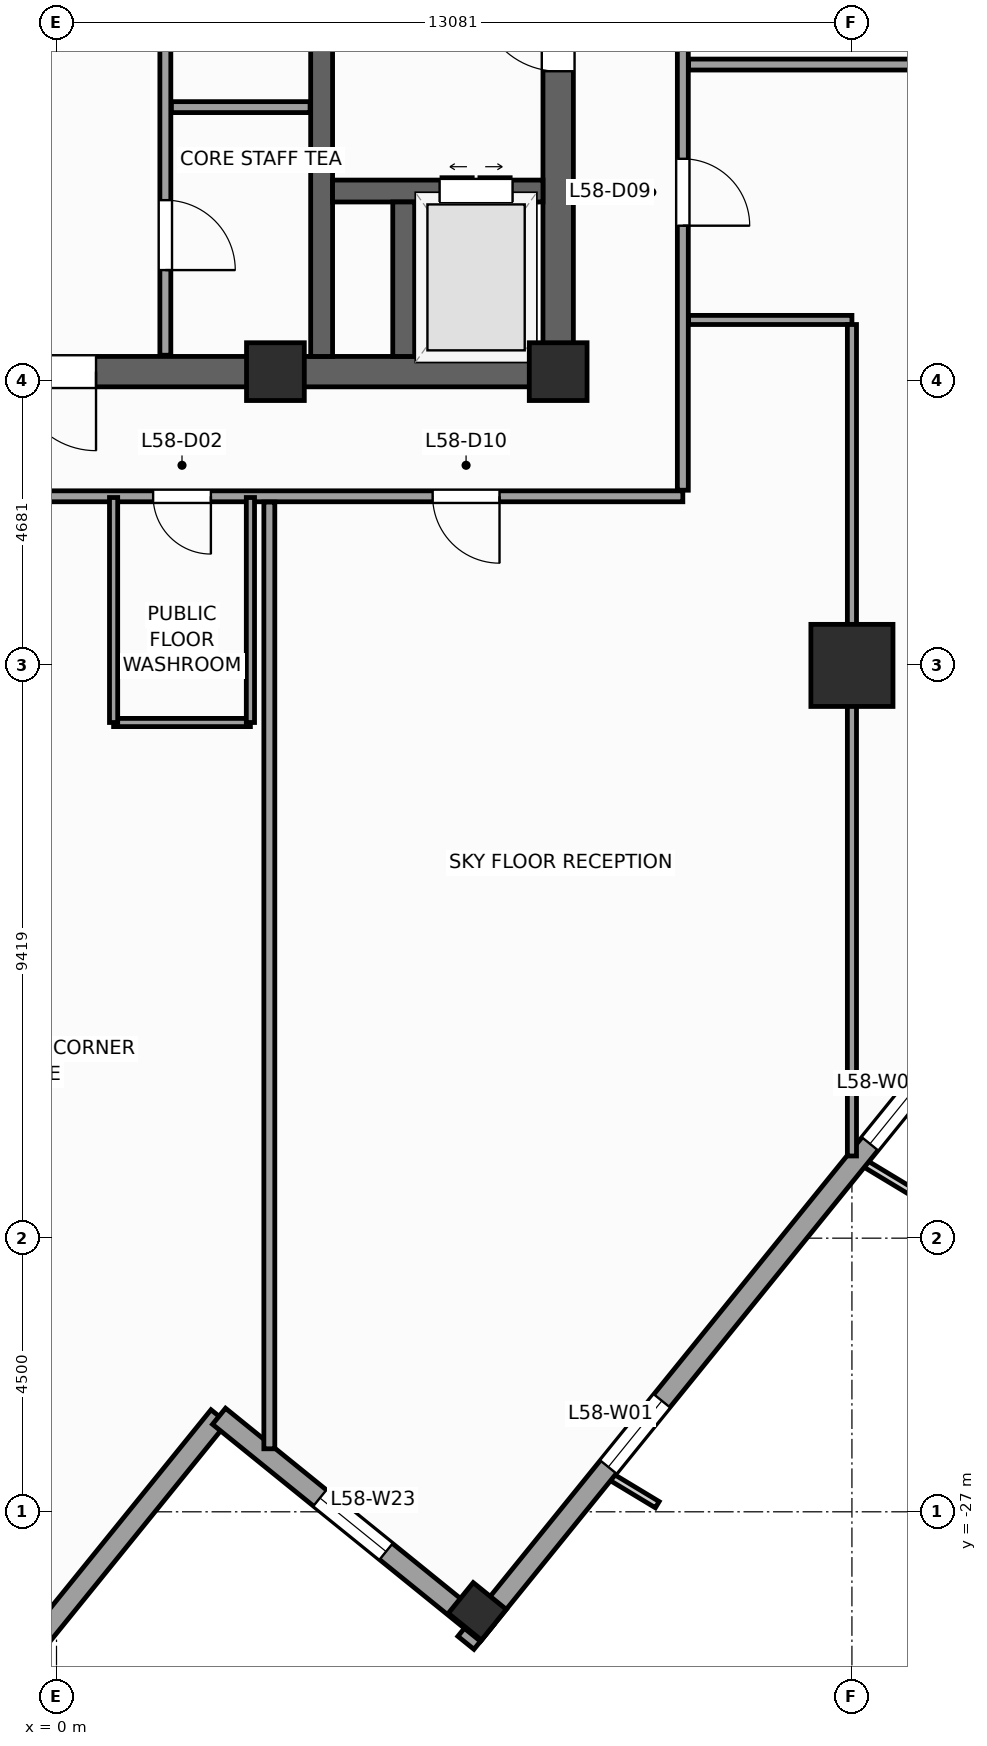
"""IFC4 building model, lengths in metres.
Left out: names, types, materials, properties, quantities, classifications, styles, units other than length and angle.
Written with IfcOpenShell. Run it as: python <this file> out.ifc"""

import sys

from ifc_helpers import new_model, si_unit, direction, frame, frame_2d, origin, origin_2d, place, context, subcontext, project, spatial, rectangle, extrude, source, transform, mapped, element, fill, save


model = new_model("IFC4")
c1 = context("Model", 3, precision=1e-05, world=origin(), true_north=direction((0.0, 1.0)))
c2 = subcontext(c1, "Body", "Model", "MODEL_VIEW")
j1 = project(units=[si_unit("LENGTHUNIT", "METRE"), si_unit("PLANEANGLEUNIT", "RADIAN")], contexts=[c1])
p1 = place(None, origin())
s1 = spatial("IfcSite", under=j1, at=p1, CompositionType="ELEMENT")
p2 = place(p1, origin())
s2 = spatial("IfcBuilding", under=s1, at=p2, CompositionType="ELEMENT")
p3 = place(p2, frame((0.0, 0.0, 240.7)))
s3 = spatial("IfcBuildingStorey", under=s2, at=p3, CompositionType="ELEMENT", Elevation=240.7)
p4 = place(p3, frame((-8.5, -8.25, 0.0), z_axis=(0.0, 0.0, 1.0), x_axis=(1.0, 0.0, 0.0)))
e1 = element("IfcWall", 1, at=p4, inside=s3, PredefinedType="SHEAR", context=c2, shape_type="SweptSolid", body=[
    extrude(rectangle(XDim=17.0, YDim=0.5, at=frame_2d((8.5, 0.0))), origin(), (0.0, 0.0, 1.0), 3.9),
])
p5 = place(p4, frame((7.85, 0.0, 0.0)))
e2 = element("IfcOpeningElement", 2, at=p5, cuts=e1, PredefinedType="OPENING", context=c2, shape_type="SweptSolid", body=[
    extrude(rectangle(XDim=1.3, YDim=2.2, at=frame_2d((0.65, 1.1))), frame((0.0, 0.26, 0.0), z_axis=(0.0, -1.0, 0.0), x_axis=(1.0, 0.0, 0.0)), (0.0, 0.0, 1.0), 0.52),
])
p6 = place(p3, frame((8.25, -8.0, 0.0), z_axis=(0.0, 0.0, 1.0), x_axis=(0.0, 1.0, 0.0)))
e3 = element("IfcWall", 3, at=p6, inside=s3, PredefinedType="SHEAR", context=c2, shape_type="SweptSolid", body=[
    extrude(rectangle(XDim=16.0, YDim=0.5, at=frame_2d((8.0, 0.0))), origin(), (0.0, 0.0, 1.0), 3.9),
])
p7 = place(p6, frame((4.69, 0.0, 0.0)))
e4 = element("IfcOpeningElement", 4, at=p7, cuts=e3, PredefinedType="OPENING", context=c2, shape_type="SweptSolid", body=[
    extrude(rectangle(XDim=1.3, YDim=2.2, at=frame_2d((0.65, 1.1))), frame((0.0, 0.26, 0.0), z_axis=(0.0, -1.0, 0.0), x_axis=(1.0, 0.0, 0.0)), (0.0, 0.0, 1.0), 0.52),
])
p8 = place(p3, frame((4.36, -8.0, 0.0), z_axis=(0.0, 0.0, 1.0), x_axis=(0.0, 1.0, 0.0)))
e5 = element("IfcWall", 5, at=p8, inside=s3, PredefinedType="SHEAR", context=c2, shape_type="SweptSolid", body=[
    extrude(rectangle(XDim=16.0, YDim=0.36, at=frame_2d((8.0, 0.0))), origin(), (0.0, 0.0, 1.0), 3.9),
])
p9 = place(p3, frame((4.54, -5.28, 0.0), z_axis=(0.0, 0.0, 1.0), x_axis=(1.0, 0.0, 0.0)))
e6 = element("IfcWall", 6, at=p9, inside=s3, PredefinedType="SHEAR", context=c2, shape_type="SweptSolid", body=[
    extrude(rectangle(XDim=3.46, YDim=0.36, at=frame_2d((1.73, 0.0))), origin(), (0.0, 0.0, 1.0), 3.9),
])
p10 = place(p9, frame((1.76, 0.0, 0.0)))
e7 = element("IfcOpeningElement", 7, at=p10, cuts=e6, PredefinedType="OPENING", context=c2, shape_type="SweptSolid", body=[
    extrude(rectangle(XDim=1.2, YDim=2.25, at=frame_2d((0.6, 1.125))), frame((0.0, 0.19, 0.0), z_axis=(0.0, -1.0, 0.0), x_axis=(1.0, 0.0, 0.0)), (0.0, 0.0, 1.0), 0.38),
])
p11 = place(p3, frame((5.71, -8.0, 0.0), z_axis=(0.0, 0.0, 1.0), x_axis=(0.0, 1.0, 0.0)))
e8 = element("IfcWall", 8, at=p11, inside=s3, PredefinedType="SHEAR", context=c2, shape_type="SweptSolid", body=[
    extrude(rectangle(XDim=2.54, YDim=0.36, at=frame_2d((1.27, 0.0))), origin(), (0.0, 0.0, 1.0), 3.9),
])
m1 = source(origin(), c2, "Body", "SweptSolid", [
    extrude(rectangle(XDim=0.95, YDim=0.95, at=origin_2d()), origin(), (0.0, 0.0, 1.0), 3.9),
])
for number, where, z_axis, x_axis in (
    (9, (8.25, -8.25, 0.0), (0.0, 0.0, 1.0), (1.0, 0.0, 0.0)),
    (10, (3.6, -8.25, 0.0), (0.0, 0.0, 1.0), (1.0, 0.0, 0.0)),
):
    element("IfcColumn", number, at=place(p3, frame(where, z_axis=z_axis, x_axis=x_axis)), inside=s3, PredefinedType="PILASTER", context=c2, shape_type="MappedRepresentation", body=[
        mapped(m1, transform((0.0, 0.0, 0.0), scale=1.0)),
    ])
m2 = source(origin(), c2, "Body", "SweptSolid", [
    extrude(rectangle(XDim=1.35, YDim=1.35, at=origin_2d()), origin(), (0.0, 0.0, 1.0), 3.9),
])
p12 = place(p3, frame((13.081, -13.081, 0.0), z_axis=(0.0, 0.0, 1.0), x_axis=(1.0, 0.0, 0.0)))
e11 = element("IfcColumn", 11, at=p12, inside=s3, PredefinedType="COLUMN", context=c2, shape_type="MappedRepresentation", body=[
    mapped(m2, transform((0.0, 0.0, 0.0), scale=1.0)),
])
m3 = source(origin(), c2, "Body", "SweptSolid", [
    extrude(rectangle(XDim=0.65, YDim=0.7, at=origin_2d()), origin(), (0.0, 0.0, 1.0), 3.9),
])
p13 = place(p3, frame((6.92, -28.637, 0.0), z_axis=(0.0, 0.0, 1.0), x_axis=(0.62932039105, 0.777145961457, 0.0)))
e12 = element("IfcColumn", 12, at=p13, inside=s3, PredefinedType="COLUMN", context=c2, shape_type="MappedRepresentation", body=[
    mapped(m3, transform((0.0, 0.0, 0.0), scale=1.0)),
])
p14 = place(p3, frame((6.733, -29.154, 0.0), z_axis=(0.0, 0.0, 1.0), x_axis=(0.629325378072, 0.77714192302, 0.0)))
e13 = element("IfcWall", 13, at=p14, inside=s3, PredefinedType="STANDARD", context=c2, shape_type="SweptSolid", body=[
    extrude(rectangle(XDim=36.84, YDim=0.34, at=frame_2d((18.42, 0.0))), origin(), (0.0, 0.0, 1.0), 2.96),
])
p15 = place(p14, frame((3.721, 0.0, 0.48)))
e14 = element("IfcOpeningElement", 14, at=p15, cuts=e13, PredefinedType="OPENING", context=c2, shape_type="SweptSolid", body=[
    extrude(rectangle(XDim=1.4, YDim=2.4, at=frame_2d((0.7, 1.2))), frame((0.0, 0.18, 0.0), z_axis=(0.0, -1.0, 0.0), x_axis=(1.0, 0.0, 0.0)), (0.0, 0.0, 1.0), 0.36),
])
p16 = place(p14, frame((10.559, 0.0, 0.58)))
e15 = element("IfcOpeningElement", 15, at=p16, cuts=e13, PredefinedType="OPENING", context=c2, shape_type="SweptSolid", body=[
    extrude(rectangle(XDim=1.75, YDim=2.3, at=frame_2d((0.875, 1.15))), frame((0.0, 0.18, 0.0), z_axis=(0.0, -1.0, 0.0), x_axis=(1.0, 0.0, 0.0)), (0.0, 0.0, 1.0), 0.36),
])
p17 = place(p14, frame((16.058, 0.0, 0.58)))
e16 = element("IfcOpeningElement", 16, at=p17, cuts=e13, PredefinedType="OPENING", context=c2, shape_type="SweptSolid", body=[
    extrude(rectangle(XDim=1.75, YDim=2.3, at=frame_2d((0.875, 1.15))), frame((0.0, 0.18, 0.0), z_axis=(0.0, -1.0, 0.0), x_axis=(1.0, 0.0, 0.0)), (0.0, 0.0, 1.0), 0.36),
])
p18 = place(p14, frame((24.176, 0.0, 0.58)))
e17 = element("IfcOpeningElement", 17, at=p18, cuts=e13, PredefinedType="OPENING", context=c2, shape_type="SweptSolid", body=[
    extrude(rectangle(XDim=1.75, YDim=2.3, at=frame_2d((0.875, 1.15))), frame((0.0, 0.18, 0.0), z_axis=(0.0, -1.0, 0.0), x_axis=(1.0, 0.0, 0.0)), (0.0, 0.0, 1.0), 0.36),
])
p19 = place(p14, frame((30.982, 0.0, 0.48)))
e18 = element("IfcOpeningElement", 18, at=p19, cuts=e13, PredefinedType="OPENING", context=c2, shape_type="SweptSolid", body=[
    extrude(rectangle(XDim=1.4, YDim=2.4, at=frame_2d((0.7, 1.2))), frame((0.0, 0.18, 0.0), z_axis=(0.0, -1.0, 0.0), x_axis=(1.0, 0.0, 0.0)), (0.0, 0.0, 1.0), 0.36),
])
p20 = place(p3, frame((-0.789, -29.703, 0.0), z_axis=(0.0, 0.0, 1.0), x_axis=(0.629323365087, 0.77714355312, 0.0)))
e19 = element("IfcWall", 19, at=p20, inside=s3, PredefinedType="STANDARD", context=c2, shape_type="SweptSolid", body=[
    extrude(rectangle(XDim=5.5, YDim=0.34, at=frame_2d((2.75, 0.0))), origin(), (0.0, 0.0, 1.0), 3.66),
])
p21 = place(p3, frame((2.673, -25.429, 0.0), z_axis=(0.0, 0.0, 1.0), x_axis=(0.777162640055, -0.629299794138, 0.0)))
e20 = element("IfcWall", 20, at=p21, inside=s3, PredefinedType="STANDARD", context=c2, shape_type="SweptSolid", body=[
    extrude(rectangle(XDim=5.67, YDim=0.34, at=frame_2d((2.835, 0.0))), origin(), (0.0, 0.0, 1.0), 3.66),
])
p22 = place(p21, frame((2.135, 0.0, 0.48)))
e21 = element("IfcOpeningElement", 21, at=p22, cuts=e20, PredefinedType="OPENING", context=c2, shape_type="SweptSolid", body=[
    extrude(rectangle(XDim=1.4, YDim=2.4, at=frame_2d((0.7, 1.2))), frame((0.0, 0.18, 0.0), z_axis=(0.0, -1.0, 0.0), x_axis=(1.0, 0.0, 0.0)), (0.0, 0.0, 1.0), 0.36),
])
p23 = place(p3, frame((1.79, -7.98, 0.0), z_axis=(0.0, 0.0, 1.0), x_axis=(0.0, 1.0, 0.0)))
e22 = element("IfcWall", 22, at=p23, inside=s3, PredefinedType="PARTITIONING", context=c2, shape_type="SweptSolid", body=[
    extrude(rectangle(XDim=12.38, YDim=0.18, at=frame_2d((6.19, 0.0))), origin(), (0.0, 0.0, 1.0), 3.66),
])
p24 = place(p23, frame((8.8, 0.0, 0.0)))
e23 = element("IfcOpeningElement", 23, at=p24, cuts=e22, PredefinedType="OPENING", context=c2, shape_type="SweptSolid", body=[
    extrude(rectangle(XDim=1.1, YDim=2.2, at=frame_2d((0.55, 1.1))), frame((0.0, 0.1, 0.0), z_axis=(0.0, -1.0, 0.0), x_axis=(1.0, 0.0, 0.0)), (0.0, 0.0, 1.0), 0.2),
])
p25 = place(p23, frame((10.86, 0.0, 0.0)))
e24 = element("IfcOpeningElement", 24, at=p25, cuts=e22, PredefinedType="OPENING", context=c2, shape_type="SweptSolid", body=[
    extrude(rectangle(XDim=1.1, YDim=2.2, at=frame_2d((0.55, 1.1))), frame((0.0, 0.1, 0.0), z_axis=(0.0, -1.0, 0.0), x_axis=(1.0, 0.0, 0.0)), (0.0, 0.0, 1.0), 0.2),
])
p26 = place(p23, frame((1.4, 0.0, 0.0)))
e25 = element("IfcOpeningElement", 25, at=p26, cuts=e22, PredefinedType="OPENING", context=c2, shape_type="SweptSolid", body=[
    extrude(rectangle(XDim=1.15, YDim=2.25, at=frame_2d((0.575, 1.125))), frame((0.0, 0.1, 0.0), z_axis=(0.0, -1.0, 0.0), x_axis=(1.0, 0.0, 0.0)), (0.0, 0.0, 1.0), 0.2),
])
p27 = place(p23, frame((5.6, 0.0, 0.0)))
e26 = element("IfcOpeningElement", 26, at=p27, cuts=e22, PredefinedType="OPENING", context=c2, shape_type="SweptSolid", body=[
    extrude(rectangle(XDim=1.15, YDim=2.25, at=frame_2d((0.575, 1.125))), frame((0.0, 0.1, 0.0), z_axis=(0.0, -1.0, 0.0), x_axis=(1.0, 0.0, 0.0)), (0.0, 0.0, 1.0), 0.2),
])
p28 = place(p3, frame((1.89, -3.9, 0.0), z_axis=(0.0, 0.0, 1.0), x_axis=(1.0, 0.0, 0.0)))
e27 = element("IfcWall", 27, at=p28, inside=s3, PredefinedType="PARTITIONING", context=c2, shape_type="SweptSolid", body=[
    extrude(rectangle(XDim=2.28, YDim=0.18, at=frame_2d((1.14, 0.0))), origin(), (0.0, 0.0, 1.0), 3.66),
])
p29 = place(p3, frame((-11.4, -10.3, 0.0), z_axis=(0.0, 0.0, 1.0), x_axis=(1.0, 0.0, 0.0)))
e28 = element("IfcWall", 28, at=p29, inside=s3, PredefinedType="PARTITIONING", context=c2, shape_type="SweptSolid", body=[
    extrude(rectangle(XDim=21.7, YDim=0.18, at=frame_2d((10.85, 0.0))), origin(), (0.0, 0.0, 1.0), 3.66),
])
p30 = place(p29, frame((12.989, 0.0, 0.0)))
e29 = element("IfcOpeningElement", 29, at=p30, cuts=e28, PredefinedType="OPENING", context=c2, shape_type="SweptSolid", body=[
    extrude(rectangle(XDim=0.95, YDim=2.1, at=frame_2d((0.475, 1.05))), frame((0.0, 0.1, 0.0), z_axis=(0.0, -1.0, 0.0), x_axis=(1.0, 0.0, 0.0)), (0.0, 0.0, 1.0), 0.2),
])
p31 = place(p29, frame((17.585, 0.0, 0.0)))
e30 = element("IfcOpeningElement", 30, at=p31, cuts=e28, PredefinedType="OPENING", context=c2, shape_type="SweptSolid", body=[
    extrude(rectangle(XDim=1.1, YDim=2.2, at=frame_2d((0.55, 1.1))), frame((0.0, 0.1, 0.0), z_axis=(0.0, -1.0, 0.0), x_axis=(1.0, 0.0, 0.0)), (0.0, 0.0, 1.0), 0.2),
])
p32 = place(p29, frame((9.075, 0.0, 0.0)))
e31 = element("IfcOpeningElement", 31, at=p32, cuts=e28, PredefinedType="OPENING", context=c2, shape_type="SweptSolid", body=[
    extrude(rectangle(XDim=1.1, YDim=2.2, at=frame_2d((0.55, 1.1))), frame((0.0, 0.1, 0.0), z_axis=(0.0, -1.0, 0.0), x_axis=(1.0, 0.0, 0.0)), (0.0, 0.0, 1.0), 0.2),
])
p33 = place(p29, frame((3.724, 0.0, 0.0)))
e32 = element("IfcOpeningElement", 32, at=p33, cuts=e28, PredefinedType="OPENING", context=c2, shape_type="SweptSolid", body=[
    extrude(rectangle(XDim=1.1, YDim=2.2, at=frame_2d((0.55, 1.1))), frame((0.0, 0.1, 0.0), z_axis=(0.0, -1.0, 0.0), x_axis=(1.0, 0.0, 0.0)), (0.0, 0.0, 1.0), 0.2),
])
p34 = place(p3, frame((10.3, -10.2, 0.0), z_axis=(0.0, 0.0, 1.0), x_axis=(0.0, 1.0, 0.0)))
e33 = element("IfcWall", 33, at=p34, inside=s3, PredefinedType="PARTITIONING", context=c2, shape_type="SweptSolid", body=[
    extrude(rectangle(XDim=20.4, YDim=0.18, at=frame_2d((10.2, 0.0))), origin(), (0.0, 0.0, 1.0), 3.66),
])
p35 = place(p34, frame((14.95, 0.0, 0.0)))
e34 = element("IfcOpeningElement", 34, at=p35, cuts=e33, PredefinedType="OPENING", context=c2, shape_type="SweptSolid", body=[
    extrude(rectangle(XDim=1.1, YDim=2.2, at=frame_2d((0.55, 1.1))), frame((0.0, 0.1, 0.0), z_axis=(0.0, -1.0, 0.0), x_axis=(1.0, 0.0, 0.0)), (0.0, 0.0, 1.0), 0.2),
])
p36 = place(p34, frame((9.65, 0.0, 0.0)))
e35 = element("IfcOpeningElement", 35, at=p36, cuts=e33, PredefinedType="OPENING", context=c2, shape_type="SweptSolid", body=[
    extrude(rectangle(XDim=1.1, YDim=2.2, at=frame_2d((0.55, 1.1))), frame((0.0, 0.1, 0.0), z_axis=(0.0, -1.0, 0.0), x_axis=(1.0, 0.0, 0.0)), (0.0, 0.0, 1.0), 0.2),
])
p37 = place(p34, frame((4.35, 0.0, 0.0)))
e36 = element("IfcOpeningElement", 36, at=p37, cuts=e33, PredefinedType="OPENING", context=c2, shape_type="SweptSolid", body=[
    extrude(rectangle(XDim=1.1, YDim=2.2, at=frame_2d((0.55, 1.1))), frame((0.0, 0.1, 0.0), z_axis=(0.0, -1.0, 0.0), x_axis=(1.0, 0.0, 0.0)), (0.0, 0.0, 1.0), 0.2),
])
p38 = place(p3, frame((10.395, -3.2, 0.0), z_axis=(0.0, 0.0, 1.0), x_axis=(1.0, 0.0, 0.0)))
e37 = element("IfcWall", 37, at=p38, inside=s3, PredefinedType="PARTITIONING", context=c2, shape_type="SweptSolid", body=[
    extrude(rectangle(XDim=17.22, YDim=0.18, at=frame_2d((8.61, 0.0))), origin(), (0.0, 0.0, 1.0), 3.66),
])
p39 = place(p3, frame((3.5, -10.395, 0.0), z_axis=(0.0, 0.0, 1.0), x_axis=(0.0, -1.0, 0.0)))
e38 = element("IfcWall", 38, at=p39, inside=s3, PredefinedType="PARTITIONING", context=c2, shape_type="SweptSolid", body=[
    extrude(rectangle(XDim=15.569, YDim=0.18, at=frame_2d((7.784, 0.0))), origin(), (0.0, 0.0, 1.0), 3.66),
])
p40 = place(p3, frame((10.395, -7.4, 0.0), z_axis=(0.0, 0.0, 1.0), x_axis=(1.0, 0.0, 0.0)))
e39 = element("IfcWall", 39, at=p40, inside=s3, PredefinedType="PARTITIONING", context=c2, shape_type="SweptSolid", body=[
    extrude(rectangle(XDim=2.686, YDim=0.15, at=frame_2d((1.343, 0.0))), origin(), (0.0, 0.0, 1.0), 3.66),
])
p41 = place(p3, frame((13.081, -7.475, 0.0), z_axis=(0.0, 0.0, 1.0), x_axis=(0.0, -1.0, 0.0)))
e40 = element("IfcWall", 40, at=p41, inside=s3, PredefinedType="PARTITIONING", context=c2, shape_type="SweptSolid", body=[
    extrude(rectangle(XDim=13.673, YDim=0.15, at=frame_2d((6.837, 0.0))), origin(), (0.0, 0.0, 1.0), 2.76),
])
p42 = place(p3, frame((0.939, -14.02, 0.0), z_axis=(0.0, 0.0, 1.0), x_axis=(1.0, 0.0, 0.0)))
e41 = element("IfcWall", 41, at=p42, inside=s3, PredefinedType="PARTITIONING", context=c2, shape_type="SweptSolid", body=[
    extrude(rectangle(XDim=2.25, YDim=0.135, at=frame_2d((1.125, 0.0))), origin(), (0.0, 0.0, 1.0), 3.66),
])
for number, where, z_axis, x_axis in (
    (42, (3.189, -14.02, 0.0), (0.0, 0.0, 1.0), (0.0, 1.0, 0.0)),
    (43, (0.939, -14.02, 0.0), (0.0, 0.0, 1.0), (0.0, 1.0, 0.0)),
):
    element("IfcWall", number, at=place(p3, frame(where, z_axis=z_axis, x_axis=x_axis)), inside=s3, PredefinedType="PARTITIONING", context=c2, shape_type="SweptSolid", body=[
        extrude(rectangle(XDim=3.7, YDim=0.135, at=frame_2d((1.85, 0.0))), origin(), (0.0, 0.0, 1.0), 3.66),
    ])
m4 = source(origin(), c2, "Body", "SweptSolid", [
    extrude(rectangle(XDim=1.4, YDim=2.4, at=frame_2d((0.7, 1.2))), frame((0.0, 0.03, 0.0), z_axis=(0.0, -1.0, 0.0), x_axis=(1.0, 0.0, 0.0)), (0.0, 0.0, 1.0), 0.06),
])
p43 = place(p15, origin())
e44 = element("IfcWindow", 44, at=p43, inside=s3, PartitioningType="SINGLE_PANEL", PredefinedType="WINDOW", context=c2, shape_type="MappedRepresentation", body=[
    mapped(m4, transform((0.0, 0.0, 0.0), scale=1.0)),
])
fill(e14, e44)
m5 = source(origin(), c2, "Body", "SweptSolid", [
    extrude(rectangle(XDim=1.75, YDim=2.3, at=frame_2d((0.875, 1.15))), frame((0.0, 0.03, 0.0), z_axis=(0.0, -1.0, 0.0), x_axis=(1.0, 0.0, 0.0)), (0.0, 0.0, 1.0), 0.06),
])
p44 = place(p16, origin())
e45 = element("IfcWindow", 45, at=p44, inside=s3, PartitioningType="SINGLE_PANEL", PredefinedType="WINDOW", context=c2, shape_type="MappedRepresentation", body=[
    mapped(m5, transform((0.0, 0.0, 0.0), scale=1.0)),
])
fill(e15, e45)
p45 = place(p22, origin())
e46 = element("IfcWindow", 46, at=p45, inside=s3, PartitioningType="SINGLE_PANEL", PredefinedType="WINDOW", context=c2, shape_type="MappedRepresentation", body=[
    mapped(m4, transform((0.0, 0.0, 0.0), scale=1.0)),
])
fill(e21, e46)
m6 = source(origin(), c2, "Body", "SweptSolid", [
    extrude(rectangle(XDim=1.3, YDim=2.2, at=frame_2d((0.65, 1.1))), frame((0.0, 0.025, 0.0), z_axis=(0.0, -1.0, 0.0), x_axis=(1.0, 0.0, 0.0)), (0.0, 0.0, 1.0), 0.05),
])
p46 = place(p7, origin())
e47 = element("IfcDoor", 47, at=p46, inside=s3, OperationType="SINGLE_SWING_RIGHT", PredefinedType="DOOR", context=c2, shape_type="MappedRepresentation", body=[
    mapped(m6, transform((0.0, 0.0, 0.0), scale=1.0)),
])
fill(e4, e47)
p47 = place(p5, frame((1.3, 0.0, 0.0), z_axis=(0.0, 0.0, 1.0), x_axis=(-1.0, 0.0, 0.0)))
e48 = element("IfcDoor", 48, at=p47, inside=s3, OperationType="SINGLE_SWING_RIGHT", PredefinedType="DOOR", context=c2, shape_type="MappedRepresentation", body=[
    mapped(m6, transform((0.0, 0.0, 0.0), scale=1.0)),
])
fill(e2, e48)
m7 = source(origin(), c2, "Body", "SweptSolid", [
    extrude(rectangle(XDim=1.2, YDim=2.25, at=frame_2d((0.6, 1.125))), frame((0.0, 0.025, 0.0), z_axis=(0.0, -1.0, 0.0), x_axis=(1.0, 0.0, 0.0)), (0.0, 0.0, 1.0), 0.05),
])
p48 = place(p10, origin())
e49 = element("IfcDoor", 49, at=p48, inside=s3, OperationType="DOUBLE_DOOR_SLIDING", PredefinedType="DOOR", context=c2, shape_type="MappedRepresentation", body=[
    mapped(m7, transform((0.0, 0.0, 0.0), scale=1.0)),
])
fill(e7, e49)
m8 = source(origin(), c2, "Body", "SweptSolid", [
    extrude(rectangle(XDim=1.15, YDim=2.25, at=frame_2d((0.575, 1.125))), frame((0.0, 0.025, 0.0), z_axis=(0.0, -1.0, 0.0), x_axis=(1.0, 0.0, 0.0)), (0.0, 0.0, 1.0), 0.05),
])
p49 = place(p26, frame((1.15, 0.0, 0.0), z_axis=(0.0, 0.0, 1.0), x_axis=(-1.0, 0.0, 0.0)))
e50 = element("IfcDoor", 50, at=p49, inside=s3, OperationType="SINGLE_SWING_LEFT", PredefinedType="DOOR", context=c2, shape_type="MappedRepresentation", body=[
    mapped(m8, transform((0.0, 0.0, 0.0), scale=1.0)),
])
fill(e25, e50)
m9 = source(origin(), c2, "Body", "SweptSolid", [
    extrude(rectangle(XDim=0.95, YDim=2.1, at=frame_2d((0.475, 1.05))), frame((0.0, 0.025, 0.0), z_axis=(0.0, -1.0, 0.0), x_axis=(1.0, 0.0, 0.0)), (0.0, 0.0, 1.0), 0.05),
])
p50 = place(p30, frame((0.95, 0.0, 0.0), z_axis=(0.0, 0.0, 1.0), x_axis=(-1.0, 0.0, 0.0)))
e51 = element("IfcDoor", 51, at=p50, inside=s3, OperationType="SINGLE_SWING_RIGHT", PredefinedType="DOOR", context=c2, shape_type="MappedRepresentation", body=[
    mapped(m9, transform((0.0, 0.0, 0.0), scale=1.0)),
])
fill(e29, e51)
m10 = source(origin(), c2, "Body", "SweptSolid", [
    extrude(rectangle(XDim=1.1, YDim=2.2, at=frame_2d((0.55, 1.1))), frame((0.0, 0.025, 0.0), z_axis=(0.0, -1.0, 0.0), x_axis=(1.0, 0.0, 0.0)), (0.0, 0.0, 1.0), 0.05),
])
p51 = place(p37, frame((1.1, 0.0, 0.0), z_axis=(0.0, 0.0, 1.0), x_axis=(-1.0, 0.0, 0.0)))
e52 = element("IfcDoor", 52, at=p51, inside=s3, OperationType="SINGLE_SWING_LEFT", PredefinedType="DOOR", context=c2, shape_type="MappedRepresentation", body=[
    mapped(m10, transform((0.0, 0.0, 0.0), scale=1.0)),
])
fill(e36, e52)
p52 = place(p31, frame((1.1, 0.0, 0.0), z_axis=(0.0, 0.0, 1.0), x_axis=(-1.0, 0.0, 0.0)))
e53 = element("IfcDoor", 53, at=p52, inside=s3, OperationType="SINGLE_SWING_RIGHT", PredefinedType="DOOR", context=c2, shape_type="MappedRepresentation", body=[
    mapped(m10, transform((0.0, 0.0, 0.0), scale=1.0)),
])
fill(e30, e53)
save(model, sys.argv[1])
